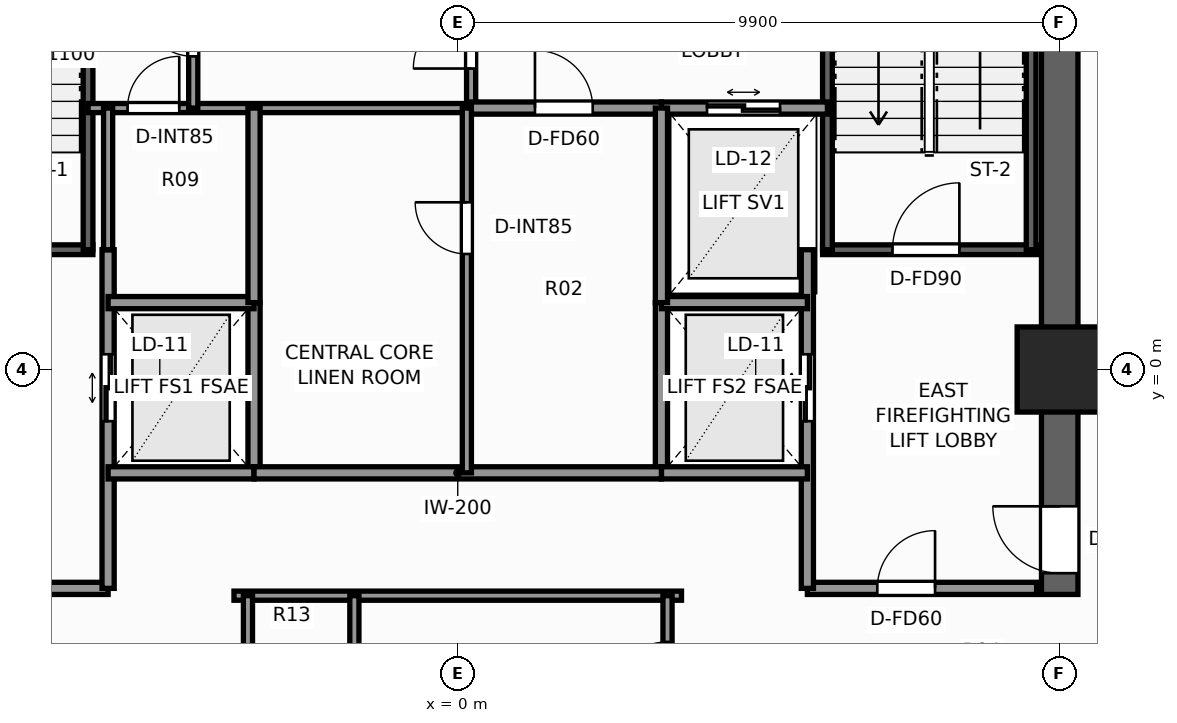
"""IFC4 building model, lengths in metres.
Left out: names, types, materials, properties, quantities, classifications, styles, units other than length and angle.
Written with IfcOpenShell. Run it as: python <this file> out.ifc"""

import sys

from ifc_helpers import new_model, si_unit, direction, frame, frame_2d, origin, origin_2d, place, context, subcontext, project, spatial, rectangle, extrude, element, fill, save


model = new_model("IFC4")
c1 = context("Model", 3, precision=1e-05, world=origin(), true_north=direction((0.0, 1.0)))
c2 = subcontext(c1, "Body", "Model", "MODEL_VIEW")
j1 = project(units=[si_unit("LENGTHUNIT", "METRE"), si_unit("PLANEANGLEUNIT", "RADIAN")], contexts=[c1])
p1 = place(None, origin())
s1 = spatial("IfcSite", under=j1, at=p1, CompositionType="ELEMENT")
p2 = place(p1, origin())
s2 = spatial("IfcBuilding", under=s1, at=p2, CompositionType="ELEMENT")
p3 = place(p2, frame((0.0, 0.0, 85.4)))
s3 = spatial("IfcBuildingStorey", under=s2, at=p3, CompositionType="ELEMENT", Elevation=85.4)
p4 = place(p3, frame((9.9, -3.7, 0.0), z_axis=(0.0, 0.0, 1.0), x_axis=(0.0, 1.0, 0.0)))
e1 = element("IfcWall", 1, at=p4, inside=s3, PredefinedType="SHEAR", context=c2, shape_type="SweptSolid", body=[
    extrude(rectangle(XDim=13.3, YDim=0.6, at=frame_2d((6.65, 0.0))), origin(), (0.0, 0.0, 1.0), 3.3),
])
p5 = place(p4, frame((0.35, 0.0, 0.0)))
e2 = element("IfcOpeningElement", 2, at=p5, cuts=e1, PredefinedType="OPENING", context=c2, shape_type="SweptSolid", body=[
    extrude(rectangle(XDim=1.1, YDim=2.2, at=frame_2d((0.55, 1.1))), frame((0.0, 0.31, 0.0), z_axis=(0.0, -1.0, 0.0), x_axis=(1.0, 0.0, 0.0)), (0.0, 0.0, 1.0), 0.62),
])
p6 = place(p3, frame((9.9, 0.0, 0.0), z_axis=(0.0, 0.0, 1.0), x_axis=(1.0, 0.0, 0.0)))
e3 = element("IfcColumn", 3, at=p6, inside=s3, PredefinedType="COLUMN", context=c2, shape_type="SweptSolid", body=[
    extrude(rectangle(XDim=1.4, YDim=1.4, at=origin_2d()), origin(), (0.0, 0.0, 1.0), 3.3),
])
p7 = place(p3, frame((-9.52, 1.97, 0.0), z_axis=(0.0, 0.0, 1.0), x_axis=(1.0, 0.0, 0.0)))
e4 = element("IfcWall", 4, at=p7, inside=s3, PredefinedType="SHEAR", context=c2, shape_type="SweptSolid", body=[
    extrude(rectangle(XDim=3.52, YDim=0.16, at=frame_2d((1.76, 0.0))), origin(), (0.0, 0.0, 1.0), 3.3),
])
p8 = place(p7, frame((1.15, 0.0, 0.0)))
e5 = element("IfcOpeningElement", 5, at=p8, cuts=e4, PredefinedType="OPENING", context=c2, shape_type="SweptSolid", body=[
    extrude(rectangle(XDim=1.1, YDim=2.2, at=frame_2d((0.55, 1.1))), frame((0.0, 0.09, 0.0), z_axis=(0.0, -1.0, 0.0), x_axis=(1.0, 0.0, 0.0)), (0.0, 0.0, 1.0), 0.18),
])
p9 = place(p3, frame((-6.08, 1.97, 0.0), z_axis=(0.0, 0.0, 1.0), x_axis=(0.0, 1.0, 0.0)))
e6 = element("IfcWall", 6, at=p9, inside=s3, PredefinedType="SHEAR", context=c2, shape_type="SweptSolid", body=[
    extrude(rectangle(XDim=7.56, YDim=0.16, at=frame_2d((3.78, 0.0))), origin(), (0.0, 0.0, 1.0), 3.3),
])
p10 = place(p3, frame((6.0, 1.97, 0.0), z_axis=(0.0, 0.0, 1.0), x_axis=(1.0, 0.0, 0.0)))
e7 = element("IfcWall", 7, at=p10, inside=s3, PredefinedType="SHEAR", context=c2, shape_type="SweptSolid", body=[
    extrude(rectangle(XDim=3.52, YDim=0.16, at=frame_2d((1.76, 0.0))), origin(), (0.0, 0.0, 1.0), 3.3),
])
p11 = place(p10, frame((1.15, 0.0, 0.0)))
e8 = element("IfcOpeningElement", 8, at=p11, cuts=e7, PredefinedType="OPENING", context=c2, shape_type="SweptSolid", body=[
    extrude(rectangle(XDim=1.1, YDim=2.2, at=frame_2d((0.55, 1.1))), frame((0.0, 0.09, 0.0), z_axis=(0.0, -1.0, 0.0), x_axis=(1.0, 0.0, 0.0)), (0.0, 0.0, 1.0), 0.18),
])
for number, where, z_axis, x_axis in (
    (9, (6.08, 1.97, 0.0), (0.0, 0.0, 1.0), (0.0, 1.0, 0.0)),
    (10, (9.43, 1.97, 0.0), (0.0, 0.0, 1.0), (0.0, 1.0, 0.0)),
):
    element("IfcWall", number, at=place(p3, frame(where, z_axis=z_axis, x_axis=x_axis)), inside=s3, PredefinedType="SHEAR", context=c2, shape_type="SweptSolid", body=[
        extrude(rectangle(XDim=7.56, YDim=0.16, at=frame_2d((3.78, 0.0))), origin(), (0.0, 0.0, 1.0), 3.3),
    ])
p12 = place(p3, frame((-9.52, -3.6, 0.0), z_axis=(0.0, 0.0, 1.0), x_axis=(1.0, 0.0, 0.0)))
e11 = element("IfcWall", 11, at=p12, inside=s3, PredefinedType="SOLIDWALL", context=c2, shape_type="SweptSolid", body=[
    extrude(rectangle(XDim=3.77, YDim=0.2, at=frame_2d((1.885, 0.0))), origin(), (0.0, 0.0, 1.0), 3.08),
])
p13 = place(p12, frame((1.15, 0.0, 0.0)))
e12 = element("IfcOpeningElement", 12, at=p13, cuts=e11, PredefinedType="OPENING", context=c2, shape_type="SweptSolid", body=[
    extrude(rectangle(XDim=0.95, YDim=2.06, at=frame_2d((0.475, 1.03))), frame((0.0, 0.11, 0.0), z_axis=(0.0, -1.0, 0.0), x_axis=(1.0, 0.0, 0.0)), (0.0, 0.0, 1.0), 0.22),
])
p14 = place(p3, frame((-5.75, -3.6, 0.0), z_axis=(0.0, 0.0, 1.0), x_axis=(0.0, 1.0, 0.0)))
e13 = element("IfcWall", 13, at=p14, inside=s3, PredefinedType="SOLIDWALL", context=c2, shape_type="SweptSolid", body=[
    extrude(rectangle(XDim=5.57, YDim=0.2, at=frame_2d((2.785, 0.0))), origin(), (0.0, 0.0, 1.0), 3.08),
])
p15 = place(p14, frame((2.75, 0.0, 0.0)))
e14 = element("IfcOpeningElement", 14, at=p15, cuts=e13, PredefinedType="OPENING", context=c2, shape_type="SweptSolid", body=[
    extrude(rectangle(XDim=1.1, YDim=2.2, at=frame_2d((0.55, 1.1))), frame((0.0, 0.11, 0.0), z_axis=(0.0, -1.0, 0.0), x_axis=(1.0, 0.0, 0.0)), (0.0, 0.0, 1.0), 0.22),
])
p16 = place(p3, frame((-3.35, -1.7, 0.0), z_axis=(0.0, 0.0, 1.0), x_axis=(0.0, 1.0, 0.0)))
e15 = element("IfcWall", 15, at=p16, inside=s3, PredefinedType="SOLIDWALL", context=c2, shape_type="SweptSolid", body=[
    extrude(rectangle(XDim=2.8, YDim=0.2, at=frame_2d((1.4, 0.0))), origin(), (0.0, 0.0, 1.0), 3.08),
])
for number, where, z_axis, x_axis in (
    (16, (-5.75, -1.7, 0.0), (0.0, 0.0, 1.0), (1.0, 0.0, 0.0)),
    (17, (-5.75, 1.1, 0.0), (0.0, 0.0, 1.0), (1.0, 0.0, 0.0)),
):
    element("IfcWall", number, at=place(p3, frame(where, z_axis=z_axis, x_axis=x_axis)), inside=s3, PredefinedType="SOLIDWALL", context=c2, shape_type="SweptSolid", body=[
        extrude(rectangle(XDim=2.4, YDim=0.2, at=frame_2d((1.2, 0.0))), origin(), (0.0, 0.0, 1.0), 3.08),
    ])
p17 = place(p3, frame((5.75, -3.6, 0.0), z_axis=(0.0, 0.0, 1.0), x_axis=(1.0, 0.0, 0.0)))
e18 = element("IfcWall", 18, at=p17, inside=s3, PredefinedType="SOLIDWALL", context=c2, shape_type="SweptSolid", body=[
    extrude(rectangle(XDim=3.77, YDim=0.2, at=frame_2d((1.885, 0.0))), origin(), (0.0, 0.0, 1.0), 3.08),
])
p18 = place(p17, frame((1.15, 0.0, 0.0)))
e19 = element("IfcOpeningElement", 19, at=p18, cuts=e18, PredefinedType="OPENING", context=c2, shape_type="SweptSolid", body=[
    extrude(rectangle(XDim=0.95, YDim=2.06, at=frame_2d((0.475, 1.03))), frame((0.0, 0.11, 0.0), z_axis=(0.0, -1.0, 0.0), x_axis=(1.0, 0.0, 0.0)), (0.0, 0.0, 1.0), 0.22),
])
p19 = place(p3, frame((5.75, -3.6, 0.0), z_axis=(0.0, 0.0, 1.0), x_axis=(0.0, 1.0, 0.0)))
e20 = element("IfcWall", 20, at=p19, inside=s3, PredefinedType="SOLIDWALL", context=c2, shape_type="SweptSolid", body=[
    extrude(rectangle(XDim=5.57, YDim=0.2, at=frame_2d((2.785, 0.0))), origin(), (0.0, 0.0, 1.0), 3.08),
])
p20 = place(p19, frame((2.75, 0.0, 0.0)))
e21 = element("IfcOpeningElement", 21, at=p20, cuts=e20, PredefinedType="OPENING", context=c2, shape_type="SweptSolid", body=[
    extrude(rectangle(XDim=1.1, YDim=2.2, at=frame_2d((0.55, 1.1))), frame((0.0, 0.11, 0.0), z_axis=(0.0, -1.0, 0.0), x_axis=(1.0, 0.0, 0.0)), (0.0, 0.0, 1.0), 0.22),
])
p21 = place(p3, frame((3.35, -1.7, 0.0), z_axis=(0.0, 0.0, 1.0), x_axis=(0.0, 1.0, 0.0)))
e22 = element("IfcWall", 22, at=p21, inside=s3, PredefinedType="SOLIDWALL", context=c2, shape_type="SweptSolid", body=[
    extrude(rectangle(XDim=2.8, YDim=0.2, at=frame_2d((1.4, 0.0))), origin(), (0.0, 0.0, 1.0), 3.08),
])
for number, where, z_axis, x_axis in (
    (23, (3.35, -1.7, 0.0), (0.0, 0.0, 1.0), (1.0, 0.0, 0.0)),
    (24, (3.35, 1.1, 0.0), (0.0, 0.0, 1.0), (1.0, 0.0, 0.0)),
):
    element("IfcWall", number, at=place(p3, frame(where, z_axis=z_axis, x_axis=x_axis)), inside=s3, PredefinedType="SOLIDWALL", context=c2, shape_type="SweptSolid", body=[
        extrude(rectangle(XDim=2.4, YDim=0.2, at=frame_2d((1.2, 0.0))), origin(), (0.0, 0.0, 1.0), 3.08),
    ])
p22 = place(p3, frame((3.35, 4.3, 0.0), z_axis=(0.0, 0.0, 1.0), x_axis=(1.0, 0.0, 0.0)))
e25 = element("IfcWall", 25, at=p22, inside=s3, PredefinedType="SOLIDWALL", context=c2, shape_type="SweptSolid", body=[
    extrude(rectangle(XDim=2.73, YDim=0.2, at=frame_2d((1.365, 0.0))), origin(), (0.0, 0.0, 1.0), 3.08),
])
p23 = place(p22, frame((0.75, 0.0, 0.0)))
e26 = element("IfcOpeningElement", 26, at=p23, cuts=e25, PredefinedType="OPENING", context=c2, shape_type="SweptSolid", body=[
    extrude(rectangle(XDim=1.2, YDim=2.25, at=frame_2d((0.6, 1.125))), frame((0.0, 0.11, 0.0), z_axis=(0.0, -1.0, 0.0), x_axis=(1.0, 0.0, 0.0)), (0.0, 0.0, 1.0), 0.22),
])
p24 = place(p3, frame((-6.08, 4.3, 0.0), z_axis=(0.0, 0.0, 1.0), x_axis=(1.0, 0.0, 0.0)))
e27 = element("IfcWall", 27, at=p24, inside=s3, PredefinedType="PARTITIONING", context=c2, shape_type="SweptSolid", body=[
    extrude(rectangle(XDim=6.3, YDim=0.15, at=frame_2d((3.15, 0.0))), origin(), (0.0, 0.0, 1.0), 3.08),
])
p25 = place(p24, frame((0.65, 0.0, 0.0)))
e28 = element("IfcOpeningElement", 28, at=p25, cuts=e27, PredefinedType="OPENING", context=c2, shape_type="SweptSolid", body=[
    extrude(rectangle(XDim=0.85, YDim=2.03, at=frame_2d((0.425, 1.015))), frame((0.0, 0.085, 0.0), z_axis=(0.0, -1.0, 0.0), x_axis=(1.0, 0.0, 0.0)), (0.0, 0.0, 1.0), 0.17),
])
p26 = place(p3, frame((0.22, 4.3, 0.0), z_axis=(0.0, 0.0, 1.0), x_axis=(0.0, 1.0, 0.0)))
e29 = element("IfcWall", 29, at=p26, inside=s3, PredefinedType="PARTITIONING", context=c2, shape_type="SweptSolid", body=[
    extrude(rectangle(XDim=5.22, YDim=0.15, at=frame_2d((2.61, 0.0))), origin(), (0.0, 0.0, 1.0), 3.08),
])
p27 = place(p26, frame((0.65, 0.0, 0.0)))
e30 = element("IfcOpeningElement", 30, at=p27, cuts=e29, PredefinedType="OPENING", context=c2, shape_type="SweptSolid", body=[
    extrude(rectangle(XDim=0.95, YDim=2.06, at=frame_2d((0.475, 1.03))), frame((0.0, 0.085, 0.0), z_axis=(0.0, -1.0, 0.0), x_axis=(1.0, 0.0, 0.0)), (0.0, 0.0, 1.0), 0.17),
])
p28 = place(p3, frame((-4.35, 4.3, 0.0), z_axis=(0.0, 0.0, 1.0), x_axis=(0.0, 1.0, 0.0)))
e31 = element("IfcWall", 31, at=p28, inside=s3, PredefinedType="PARTITIONING", context=c2, shape_type="SweptSolid", body=[
    extrude(rectangle(XDim=5.22, YDim=0.15, at=frame_2d((2.61, 0.0))), origin(), (0.0, 0.0, 1.0), 3.08),
])
p29 = place(p28, frame((0.85, 0.0, 0.0)))
e32 = element("IfcOpeningElement", 32, at=p29, cuts=e31, PredefinedType="OPENING", context=c2, shape_type="SweptSolid", body=[
    extrude(rectangle(XDim=0.85, YDim=2.03, at=frame_2d((0.425, 1.015))), frame((0.0, 0.085, 0.0), z_axis=(0.0, -1.0, 0.0), x_axis=(1.0, 0.0, 0.0)), (0.0, 0.0, 1.0), 0.17),
])
p30 = place(p3, frame((0.22, 4.3, 0.0), z_axis=(0.0, 0.0, 1.0), x_axis=(1.0, 0.0, 0.0)))
e33 = element("IfcWall", 33, at=p30, inside=s3, PredefinedType="SOLIDWALL", context=c2, shape_type="SweptSolid", body=[
    extrude(rectangle(XDim=3.13, YDim=0.2, at=frame_2d((1.565, 0.0))), origin(), (0.0, 0.0, 1.0), 3.08),
])
p31 = place(p30, frame((1.05, 0.0, 0.0)))
e34 = element("IfcOpeningElement", 34, at=p31, cuts=e33, PredefinedType="OPENING", context=c2, shape_type="SweptSolid", body=[
    extrude(rectangle(XDim=0.95, YDim=2.06, at=frame_2d((0.475, 1.03))), frame((0.0, 0.11, 0.0), z_axis=(0.0, -1.0, 0.0), x_axis=(1.0, 0.0, 0.0)), (0.0, 0.0, 1.0), 0.22),
])
p32 = place(p3, frame((-3.35, -1.7, 0.0), z_axis=(0.0, 0.0, 1.0), x_axis=(1.0, 0.0, 0.0)))
e35 = element("IfcWall", 35, at=p32, inside=s3, PredefinedType="SOLIDWALL", context=c2, shape_type="SweptSolid", body=[
    extrude(rectangle(XDim=6.7, YDim=0.2, at=frame_2d((3.35, 0.0))), origin(), (0.0, 0.0, 1.0), 3.08),
])
for number, where, z_axis, x_axis in (
    (36, (-3.35, 1.1, 0.0), (0.0, 0.0, 1.0), (0.0, 1.0, 0.0)),
    (37, (3.35, 1.1, 0.0), (0.0, 0.0, 1.0), (0.0, 1.0, 0.0)),
):
    element("IfcWall", number, at=place(p3, frame(where, z_axis=z_axis, x_axis=x_axis)), inside=s3, PredefinedType="SOLIDWALL", context=c2, shape_type="SweptSolid", body=[
        extrude(rectangle(XDim=3.2, YDim=0.2, at=frame_2d((1.6, 0.0))), origin(), (0.0, 0.0, 1.0), 3.08),
    ])
p33 = place(p3, frame((0.15, -1.7, 0.0), z_axis=(0.0, 0.0, 1.0), x_axis=(0.0, 1.0, 0.0)))
e38 = element("IfcWall", 38, at=p33, inside=s3, PredefinedType="PARTITIONING", context=c2, shape_type="SweptSolid", body=[
    extrude(rectangle(XDim=6.0, YDim=0.15, at=frame_2d((3.0, 0.0))), origin(), (0.0, 0.0, 1.0), 3.08),
])
p34 = place(p33, frame((3.6, 0.0, 0.0)))
e39 = element("IfcOpeningElement", 39, at=p34, cuts=e38, PredefinedType="OPENING", context=c2, shape_type="SweptSolid", body=[
    extrude(rectangle(XDim=0.85, YDim=2.03, at=frame_2d((0.425, 1.015))), frame((0.0, 0.085, 0.0), z_axis=(0.0, -1.0, 0.0), x_axis=(1.0, 0.0, 0.0)), (0.0, 0.0, 1.0), 0.17),
])
p35 = place(p3, frame((-3.68, -3.72, 0.0), z_axis=(0.0, 0.0, 1.0), x_axis=(1.0, 0.0, 0.0)))
e40 = element("IfcWall", 40, at=p35, inside=s3, PredefinedType="PARTITIONING", context=c2, shape_type="SweptSolid", body=[
    extrude(rectangle(XDim=7.36, YDim=0.15, at=frame_2d((3.68, 0.0))), origin(), (0.0, 0.0, 1.0), 3.08),
])
p36 = place(p3, frame((3.45, -6.08, 0.0), z_axis=(0.0, 0.0, 1.0), x_axis=(0.0, 1.0, 0.0)))
e41 = element("IfcWall", 41, at=p36, inside=s3, PredefinedType="PARTITIONING", context=c2, shape_type="SweptSolid", body=[
    extrude(rectangle(XDim=2.36, YDim=0.15, at=frame_2d((1.18, 0.0))), origin(), (0.0, 0.0, 1.0), 3.08),
])
p37 = place(p36, frame((0.65, 0.0, 0.0)))
e42 = element("IfcOpeningElement", 42, at=p37, cuts=e41, PredefinedType="OPENING", context=c2, shape_type="SweptSolid", body=[
    extrude(rectangle(XDim=0.95, YDim=2.06, at=frame_2d((0.475, 1.03))), frame((0.0, 0.085, 0.0), z_axis=(0.0, -1.0, 0.0), x_axis=(1.0, 0.0, 0.0)), (0.0, 0.0, 1.0), 0.17),
])
p38 = place(p3, frame((-3.45, -6.08, 0.0), z_axis=(0.0, 0.0, 1.0), x_axis=(0.0, 1.0, 0.0)))
e43 = element("IfcWall", 43, at=p38, inside=s3, PredefinedType="PARTITIONING", context=c2, shape_type="SweptSolid", body=[
    extrude(rectangle(XDim=2.36, YDim=0.15, at=frame_2d((1.18, 0.0))), origin(), (0.0, 0.0, 1.0), 3.08),
])
p39 = place(p3, frame((-1.7, -6.08, 0.0), z_axis=(0.0, 0.0, 1.0), x_axis=(0.0, 1.0, 0.0)))
e44 = element("IfcWall", 44, at=p39, inside=s3, PredefinedType="PARTITIONING", context=c2, shape_type="SweptSolid", body=[
    extrude(rectangle(XDim=2.36, YDim=0.15, at=frame_2d((1.18, 0.0))), origin(), (0.0, 0.0, 1.0), 3.08),
])
p40 = place(p39, frame((0.65, 0.0, 0.0)))
e45 = element("IfcOpeningElement", 45, at=p40, cuts=e44, PredefinedType="OPENING", context=c2, shape_type="SweptSolid", body=[
    extrude(rectangle(XDim=0.9, YDim=2.06, at=frame_2d((0.45, 1.03))), frame((0.0, 0.085, 0.0), z_axis=(0.0, -1.0, 0.0), x_axis=(1.0, 0.0, 0.0)), (0.0, 0.0, 1.0), 0.17),
])
p41 = place(p3, frame((-5.75, 1.97, 0.0), z_axis=(0.0, 0.0, 1.0), x_axis=(0.0, 1.0, 0.0)))
e46 = element("IfcWall", 46, at=p41, inside=s3, PredefinedType="PARTITIONING", context=c2, shape_type="SweptSolid", body=[
    extrude(rectangle(XDim=2.33, YDim=0.15, at=frame_2d((1.165, 0.0))), origin(), (0.0, 0.0, 1.0), 3.08),
])
p42 = place(p11, origin())
e47 = element("IfcDoor", 47, at=p42, inside=s3, OperationType="SINGLE_SWING_RIGHT", PredefinedType="DOOR", context=c2, shape_type="SweptSolid", body=[
    extrude(rectangle(XDim=1.1, YDim=2.2, at=frame_2d((0.55, 1.1))), frame((0.0, 0.025, 0.0), z_axis=(0.0, -1.0, 0.0), x_axis=(1.0, 0.0, 0.0)), (0.0, 0.0, 1.0), 0.05),
])
fill(e8, e47)
p43 = place(p15, origin())
e48 = element("IfcDoor", 48, at=p43, inside=s3, OperationType="DOUBLE_DOOR_SLIDING", PredefinedType="DOOR", context=c2, shape_type="SweptSolid", body=[
    extrude(rectangle(XDim=1.1, YDim=2.2, at=frame_2d((0.55, 1.1))), frame((0.0, 0.025, 0.0), z_axis=(0.0, -1.0, 0.0), x_axis=(1.0, 0.0, 0.0)), (0.0, 0.0, 1.0), 0.05),
])
fill(e14, e48)
p44 = place(p5, origin())
e49 = element("IfcDoor", 49, at=p44, inside=s3, OperationType="SINGLE_SWING_RIGHT", PredefinedType="DOOR", context=c2, shape_type="SweptSolid", body=[
    extrude(rectangle(XDim=1.1, YDim=2.2, at=frame_2d((0.55, 1.1))), frame((0.0, 0.025, 0.0), z_axis=(0.0, -1.0, 0.0), x_axis=(1.0, 0.0, 0.0)), (0.0, 0.0, 1.0), 0.05),
])
fill(e2, e49)
p45 = place(p20, origin())
e50 = element("IfcDoor", 50, at=p45, inside=s3, OperationType="DOUBLE_DOOR_SLIDING", PredefinedType="DOOR", context=c2, shape_type="SweptSolid", body=[
    extrude(rectangle(XDim=1.1, YDim=2.2, at=frame_2d((0.55, 1.1))), frame((0.0, 0.025, 0.0), z_axis=(0.0, -1.0, 0.0), x_axis=(1.0, 0.0, 0.0)), (0.0, 0.0, 1.0), 0.05),
])
fill(e21, e50)
p46 = place(p23, origin())
e51 = element("IfcDoor", 51, at=p46, inside=s3, OperationType="DOUBLE_DOOR_SLIDING", PredefinedType="DOOR", context=c2, shape_type="SweptSolid", body=[
    extrude(rectangle(XDim=1.2, YDim=2.25, at=frame_2d((0.6, 1.125))), frame((0.0, 0.025, 0.0), z_axis=(0.0, -1.0, 0.0), x_axis=(1.0, 0.0, 0.0)), (0.0, 0.0, 1.0), 0.05),
])
fill(e26, e51)
p47 = place(p27, origin())
e52 = element("IfcDoor", 52, at=p47, inside=s3, OperationType="SINGLE_SWING_LEFT", PredefinedType="DOOR", context=c2, shape_type="SweptSolid", body=[
    extrude(rectangle(XDim=0.95, YDim=2.06, at=frame_2d((0.475, 1.03))), frame((0.0, 0.025, 0.0), z_axis=(0.0, -1.0, 0.0), x_axis=(1.0, 0.0, 0.0)), (0.0, 0.0, 1.0), 0.05),
])
fill(e30, e52)
p48 = place(p29, origin())
e53 = element("IfcDoor", 53, at=p48, inside=s3, OperationType="SINGLE_SWING_RIGHT", PredefinedType="DOOR", context=c2, shape_type="SweptSolid", body=[
    extrude(rectangle(XDim=0.85, YDim=2.03, at=frame_2d((0.425, 1.015))), frame((0.0, 0.025, 0.0), z_axis=(0.0, -1.0, 0.0), x_axis=(1.0, 0.0, 0.0)), (0.0, 0.0, 1.0), 0.05),
])
fill(e32, e53)
p49 = place(p18, origin())
e54 = element("IfcDoor", 54, at=p49, inside=s3, OperationType="SINGLE_SWING_RIGHT", PredefinedType="DOOR", context=c2, shape_type="SweptSolid", body=[
    extrude(rectangle(XDim=0.95, YDim=2.06, at=frame_2d((0.475, 1.03))), frame((0.0, 0.025, 0.0), z_axis=(0.0, -1.0, 0.0), x_axis=(1.0, 0.0, 0.0)), (0.0, 0.0, 1.0), 0.05),
])
fill(e19, e54)
p50 = place(p31, origin())
e55 = element("IfcDoor", 55, at=p50, inside=s3, OperationType="SINGLE_SWING_LEFT", PredefinedType="DOOR", context=c2, shape_type="SweptSolid", body=[
    extrude(rectangle(XDim=0.95, YDim=2.06, at=frame_2d((0.475, 1.03))), frame((0.0, 0.025, 0.0), z_axis=(0.0, -1.0, 0.0), x_axis=(1.0, 0.0, 0.0)), (0.0, 0.0, 1.0), 0.05),
])
fill(e34, e55)
p51 = place(p34, origin())
e56 = element("IfcDoor", 56, at=p51, inside=s3, OperationType="SINGLE_SWING_RIGHT", PredefinedType="DOOR", context=c2, shape_type="SweptSolid", body=[
    extrude(rectangle(XDim=0.85, YDim=2.03, at=frame_2d((0.425, 1.015))), frame((0.0, 0.025, 0.0), z_axis=(0.0, -1.0, 0.0), x_axis=(1.0, 0.0, 0.0)), (0.0, 0.0, 1.0), 0.05),
])
fill(e39, e56)
p52 = place(p37, origin())
e57 = element("IfcDoor", 57, at=p52, inside=s3, OperationType="SINGLE_SWING_LEFT", PredefinedType="DOOR", context=c2, shape_type="SweptSolid", body=[
    extrude(rectangle(XDim=0.95, YDim=2.06, at=frame_2d((0.475, 1.03))), frame((0.0, 0.025, 0.0), z_axis=(0.0, -1.0, 0.0), x_axis=(1.0, 0.0, 0.0)), (0.0, 0.0, 1.0), 0.05),
])
fill(e42, e57)
p53 = place(p25, origin())
e58 = element("IfcDoor", 58, at=p53, inside=s3, OperationType="SINGLE_SWING_RIGHT", PredefinedType="DOOR", context=c2, shape_type="SweptSolid", body=[
    extrude(rectangle(XDim=0.85, YDim=2.03, at=frame_2d((0.425, 1.015))), frame((0.0, 0.025, 0.0), z_axis=(0.0, -1.0, 0.0), x_axis=(1.0, 0.0, 0.0)), (0.0, 0.0, 1.0), 0.05),
])
fill(e28, e58)
save(model, sys.argv[1])
